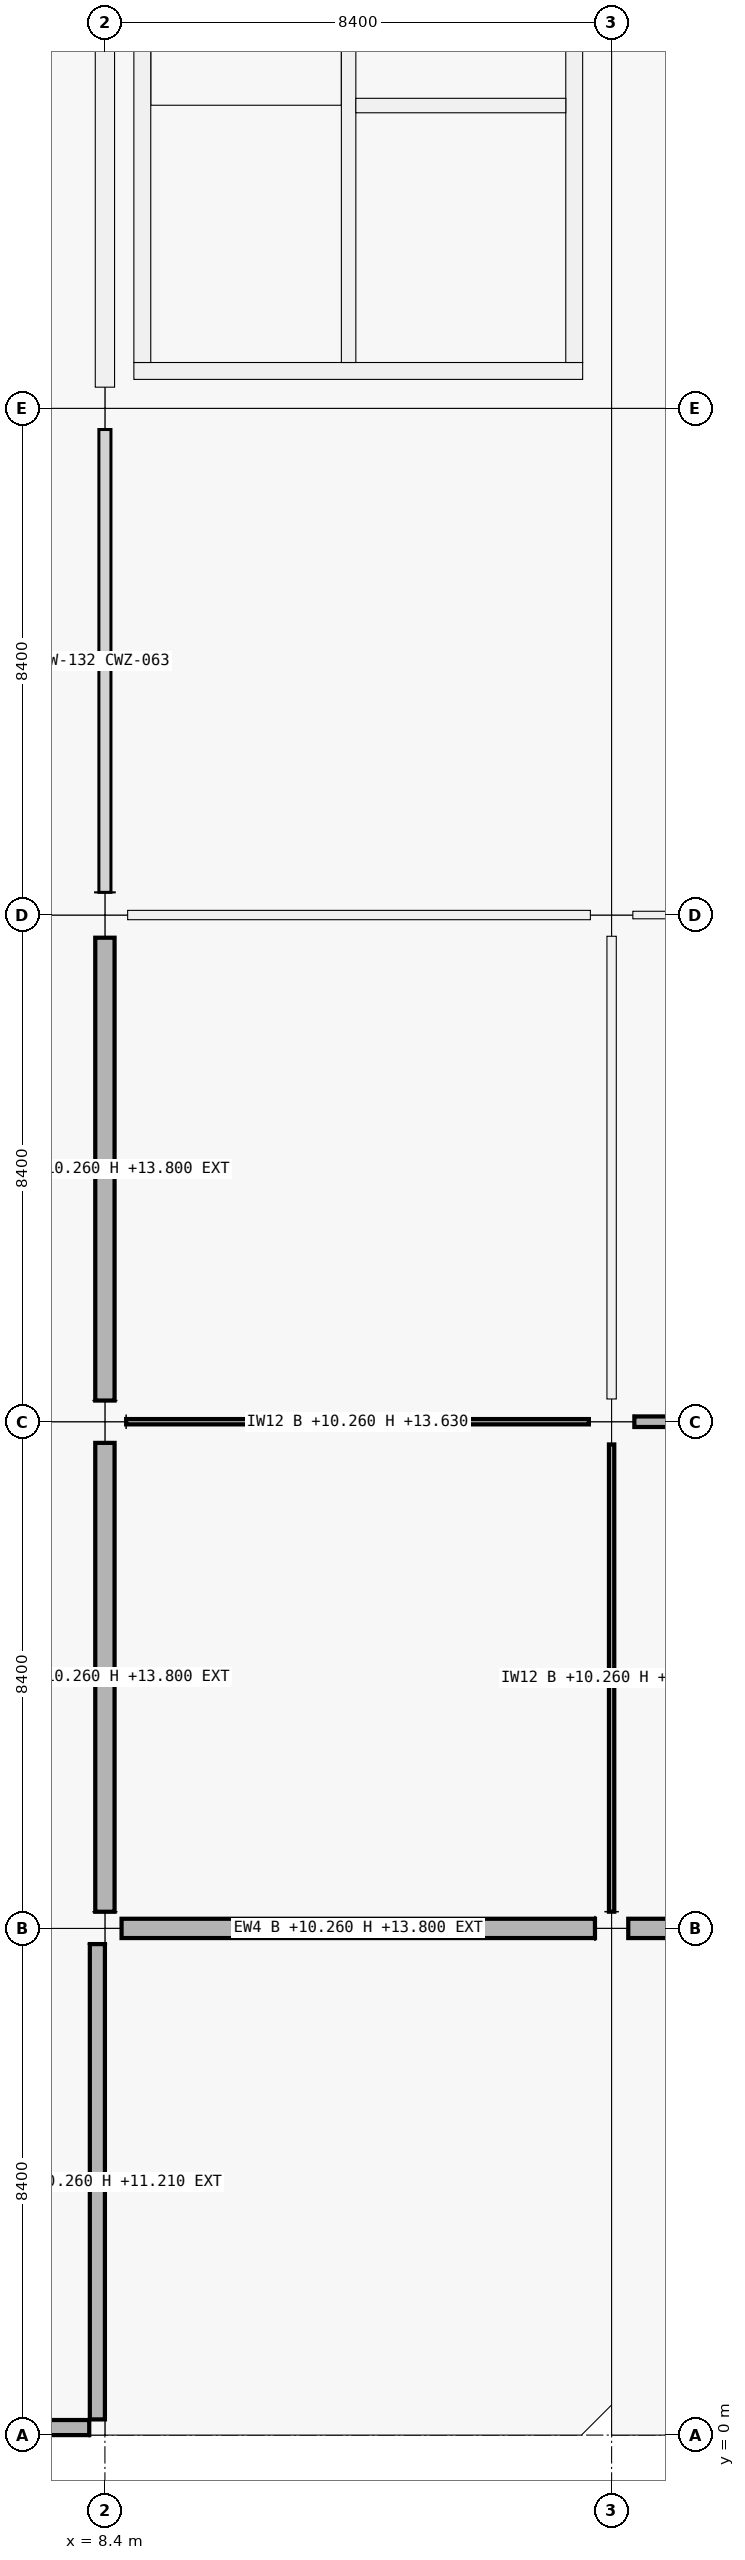
"""IFC4 building model, lengths in metres.
Left out: names, types, materials, properties, quantities, classifications, styles, units other than length and angle.
Written with IfcOpenShell. Run it as: python <this file> out.ifc"""

import sys

from ifc_helpers import new_model, si_unit, direction, frame, frame_2d, origin, origin_2d, place, context, subcontext, project, spatial, rectangle, extrude, element, fill, save


model = new_model("IFC4")
c1 = context("Model", 3, precision=1e-05, world=origin(), true_north=direction((0.0, 1.0)))
c2 = subcontext(c1, "Body", "Model", "MODEL_VIEW")
j1 = project(units=[si_unit("LENGTHUNIT", "METRE"), si_unit("PLANEANGLEUNIT", "RADIAN")], contexts=[c1])
p1 = place(None, origin())
s1 = spatial("IfcSite", under=j1, at=p1, CompositionType="ELEMENT")
p2 = place(p1, origin())
s2 = spatial("IfcBuilding", under=s1, at=p2, CompositionType="ELEMENT")
p3 = place(p2, frame((0.0, 0.0, 10.26)))
s3 = spatial("IfcBuildingStorey", under=s2, at=p3, CompositionType="ELEMENT", Elevation=10.26)
p4 = place(p3, frame((8.4, 8.4, 0.0), z_axis=(0.0, 0.0, 1.0), x_axis=(1.0, 0.0, 0.0)))
e1 = element("IfcColumn", 1, at=p4, inside=s3, PredefinedType="COLUMN", context=c2, shape_type="SweptSolid", body=[
    extrude(rectangle(XDim=0.55, YDim=0.55, at=origin_2d()), origin(), (0.0, 0.0, 1.0), 4.25),
])
p5 = place(p3, frame((8.4, 16.8, 0.0), z_axis=(0.0, 0.0, 1.0), x_axis=(1.0, 0.0, 0.0)))
e2 = element("IfcColumn", 2, at=p5, inside=s3, PredefinedType="COLUMN", context=c2, shape_type="SweptSolid", body=[
    extrude(rectangle(XDim=0.7, YDim=0.7, at=origin_2d()), origin(), (0.0, 0.0, 1.0), 4.5),
])
p6 = place(p3, frame((8.4, 25.2, 0.0), z_axis=(0.0, 0.0, 1.0), x_axis=(1.0, 0.0, 0.0)))
e3 = element("IfcColumn", 3, at=p6, inside=s3, PredefinedType="COLUMN", context=c2, shape_type="SweptSolid", body=[
    extrude(rectangle(XDim=0.75, YDim=0.75, at=origin_2d()), origin(), (0.0, 0.0, 1.0), 4.5),
])
p7 = place(p3, frame((8.4, 33.6, 0.0), z_axis=(0.0, 0.0, 1.0), x_axis=(1.0, 0.0, 0.0)))
e4 = element("IfcColumn", 4, at=p7, inside=s3, PredefinedType="COLUMN", context=c2, shape_type="SweptSolid", body=[
    extrude(rectangle(XDim=0.7, YDim=0.7, at=origin_2d()), origin(), (0.0, 0.0, 1.0), 4.5),
])
p8 = place(p3, frame((16.8, 8.4, 0.0), z_axis=(0.0, 0.0, 1.0), x_axis=(1.0, 0.0, 0.0)))
e5 = element("IfcColumn", 5, at=p8, inside=s3, PredefinedType="COLUMN", context=c2, shape_type="SweptSolid", body=[
    extrude(rectangle(XDim=0.55, YDim=0.55, at=origin_2d()), origin(), (0.0, 0.0, 1.0), 4.25),
])
p9 = place(p3, frame((16.8, 16.8, 0.0), z_axis=(0.0, 0.0, 1.0), x_axis=(1.0, 0.0, 0.0)))
e6 = element("IfcColumn", 6, at=p9, inside=s3, PredefinedType="COLUMN", context=c2, shape_type="SweptSolid", body=[
    extrude(rectangle(XDim=0.75, YDim=0.75, at=origin_2d()), origin(), (0.0, 0.0, 1.0), 4.5),
])
p10 = place(p3, frame((16.8, 25.2, 0.0), z_axis=(0.0, 0.0, 1.0), x_axis=(1.0, 0.0, 0.0)))
e7 = element("IfcColumn", 7, at=p10, inside=s3, PredefinedType="COLUMN", context=c2, shape_type="SweptSolid", body=[
    extrude(rectangle(XDim=0.7, YDim=0.7, at=origin_2d()), origin(), (0.0, 0.0, 1.0), 4.5),
])
p11 = place(p3, frame((16.8, 33.6, 0.0), z_axis=(0.0, 0.0, 1.0), x_axis=(1.0, 0.0, 0.0)))
e8 = element("IfcColumn", 8, at=p11, inside=s3, PredefinedType="COLUMN", context=c2, shape_type="SweptSolid", body=[
    extrude(rectangle(XDim=0.75, YDim=0.75, at=origin_2d()), origin(), (0.0, 0.0, 1.0), 4.5),
])
p12 = place(p3, frame((16.524, 8.4, 0.0), z_axis=(0.0, 0.0, 1.0), x_axis=(-1.0, 0.0, 0.0)))
e9 = element("IfcWall", 9, at=p12, inside=s3, PredefinedType="SOLIDWALL", context=c2, shape_type="SweptSolid", body=[
    extrude(rectangle(XDim=7.848, YDim=0.32, at=frame_2d((3.924, 0.0))), origin(), (0.0, 0.0, 1.0), 3.54),
])
p13 = place(p12, frame((2.999, 0.0, 0.0)))
e10 = element("IfcOpeningElement", 10, at=p13, cuts=e9, PredefinedType="OPENING", context=c2, shape_type="SweptSolid", body=[
    extrude(rectangle(XDim=1.85, YDim=2.2, at=frame_2d((0.925, 1.1))), frame((0.0, 0.16, 0.0), z_axis=(0.0, -1.0, 0.0), x_axis=(1.0, 0.0, 0.0)), (0.0, 0.0, 1.0), 0.32),
])
p14 = place(p3, frame((8.4, 8.676, 0.0), z_axis=(0.0, 0.0, 1.0), x_axis=(0.0, 1.0, 0.0)))
e11 = element("IfcWall", 11, at=p14, inside=s3, PredefinedType="SOLIDWALL", context=c2, shape_type="SweptSolid", body=[
    extrude(rectangle(XDim=7.773, YDim=0.32, at=frame_2d((3.886, 0.0))), origin(), (0.0, 0.0, 1.0), 3.54),
])
p15 = place(p14, frame((2.861, 0.0, 0.9)))
e12 = element("IfcOpeningElement", 12, at=p15, cuts=e11, PredefinedType="OPENING", context=c2, shape_type="SweptSolid", body=[
    extrude(rectangle(XDim=2.05, YDim=1.45, at=frame_2d((1.025, 0.725))), frame((0.0, 0.16, 0.0), z_axis=(0.0, -1.0, 0.0), x_axis=(1.0, 0.0, 0.0)), (0.0, 0.0, 1.0), 0.32),
])
p16 = place(p3, frame((8.4, 17.151, 0.0), z_axis=(0.0, 0.0, 1.0), x_axis=(0.0, 1.0, 0.0)))
e13 = element("IfcWall", 13, at=p16, inside=s3, PredefinedType="SOLIDWALL", context=c2, shape_type="SweptSolid", body=[
    extrude(rectangle(XDim=7.673, YDim=0.32, at=frame_2d((3.836, 0.0))), origin(), (0.0, 0.0, 1.0), 3.54),
])
p17 = place(p16, frame((2.611, 0.0, 0.9)))
e14 = element("IfcOpeningElement", 14, at=p17, cuts=e13, PredefinedType="OPENING", context=c2, shape_type="SweptSolid", body=[
    extrude(rectangle(XDim=2.45, YDim=1.45, at=frame_2d((1.225, 0.725))), frame((0.0, 0.16, 0.0), z_axis=(0.0, -1.0, 0.0), x_axis=(1.0, 0.0, 0.0)), (0.0, 0.0, 1.0), 0.32),
])
p18 = place(p3, frame((8.4, 33.951, 0.0), z_axis=(0.0, 0.0, 1.0), x_axis=(0.0, 1.0, 0.0)))
e15 = element("IfcWall", 15, at=p18, inside=s3, PredefinedType="SOLIDWALL", context=c2, shape_type="SweptSolid", body=[
    extrude(rectangle(XDim=7.673, YDim=0.32, at=frame_2d((3.836, 0.0))), origin(), (0.0, 0.0, 1.0), 3.54),
])
p19 = place(p3, frame((24.924, 8.4, 0.0), z_axis=(0.0, 0.0, 1.0), x_axis=(-1.0, 0.0, 0.0)))
e16 = element("IfcWall", 16, at=p19, inside=s3, PredefinedType="SOLIDWALL", context=c2, shape_type="SweptSolid", body=[
    extrude(rectangle(XDim=7.848, YDim=0.32, at=frame_2d((3.924, 0.0))), origin(), (0.0, 0.0, 1.0), 3.54),
])
p20 = place(p19, frame((3.099, 0.0, 0.0)))
e17 = element("IfcOpeningElement", 17, at=p20, cuts=e16, PredefinedType="OPENING", context=c2, shape_type="SweptSolid", body=[
    extrude(rectangle(XDim=1.65, YDim=2.2, at=frame_2d((0.825, 1.1))), frame((0.0, 0.16, 0.0), z_axis=(0.0, -1.0, 0.0), x_axis=(1.0, 0.0, 0.0)), (0.0, 0.0, 1.0), 0.32),
])
for number, where, z_axis, x_axis in (
    (18, (8.14, 0.125, 0.0), (0.0, 0.0, 1.0), (-1.0, 0.0, 0.0)),
    (19, (8.275, 8.14, 0.0), (0.0, 0.0, 1.0), (0.0, -1.0, 0.0)),
):
    element("IfcWall", number, at=place(p3, frame(where, z_axis=z_axis, x_axis=x_axis)), inside=s3, PredefinedType="PARAPET", context=c2, shape_type="SweptSolid", body=[
        extrude(rectangle(XDim=7.88, YDim=0.25, at=frame_2d((3.94, 0.0))), origin(), (0.0, 0.0, 1.0), 0.95),
    ])
p21 = place(p3, frame((16.32, 34.22, 0.0), z_axis=(0.0, 0.0, 1.0), x_axis=(-1.0, 0.0, 0.0)))
e20 = element("IfcWall", 20, at=p21, inside=s3, PredefinedType="SHEAR", context=c2, shape_type="SweptSolid", body=[
    extrude(rectangle(XDim=7.44, YDim=0.28, at=frame_2d((3.72, 0.0))), origin(), (0.0, 0.0, 1.0), 4.5),
])
p22 = place(p21, frame((1.28, 0.0, 0.0)))
e21 = element("IfcOpeningElement", 21, at=p22, cuts=e20, PredefinedType="OPENING", context=c2, shape_type="SweptSolid", body=[
    extrude(rectangle(XDim=1.5, YDim=2.15, at=frame_2d((0.75, 1.075))), frame((0.0, 0.14, 0.0), z_axis=(0.0, -1.0, 0.0), x_axis=(1.0, 0.0, 0.0)), (0.0, 0.0, 1.0), 0.28),
])
for number, where, z_axis, x_axis in (
    (22, (9.02, 34.36, 0.0), (0.0, 0.0, 1.0), (0.0, 1.0, 0.0)),
    (23, (16.18, 41.24, 0.0), (0.0, 0.0, 1.0), (0.0, -1.0, 0.0)),
):
    element("IfcWall", number, at=place(p3, frame(where, z_axis=z_axis, x_axis=x_axis)), inside=s3, PredefinedType="SHEAR", context=c2, shape_type="SweptSolid", body=[
        extrude(rectangle(XDim=6.88, YDim=0.28, at=frame_2d((3.44, 0.0))), origin(), (0.0, 0.0, 1.0), 4.5),
    ])
p23 = place(p3, frame((12.44, 34.36, 0.0), z_axis=(0.0, 0.0, 1.0), x_axis=(0.0, 1.0, 0.0)))
e24 = element("IfcWall", 24, at=p23, inside=s3, PredefinedType="SHEAR", context=c2, shape_type="SweptSolid", body=[
    extrude(rectangle(XDim=6.88, YDim=0.24, at=frame_2d((3.44, 0.0))), origin(), (0.0, 0.0, 1.0), 4.5),
])
p24 = place(p23, frame((0.12, 0.0, 0.0)))
e25 = element("IfcOpeningElement", 25, at=p24, cuts=e24, PredefinedType="OPENING", context=c2, shape_type="SweptSolid", body=[
    extrude(rectangle(XDim=1.0, YDim=2.15, at=frame_2d((0.5, 1.075))), frame((0.0, 0.12, 0.0), z_axis=(0.0, -1.0, 0.0), x_axis=(1.0, 0.0, 0.0)), (0.0, 0.0, 1.0), 0.24),
])
p25 = place(p3, frame((12.56, 38.62, 0.0), z_axis=(0.0, 0.0, 1.0), x_axis=(1.0, 0.0, 0.0)))
e26 = element("IfcWall", 26, at=p25, inside=s3, PredefinedType="SHEAR", context=c2, shape_type="SweptSolid", body=[
    extrude(rectangle(XDim=3.48, YDim=0.24, at=frame_2d((1.74, 0.0))), origin(), (0.0, 0.0, 1.0), 4.5),
])
p26 = place(p25, frame((1.19, 0.0, 0.0)))
e27 = element("IfcOpeningElement", 27, at=p26, cuts=e26, PredefinedType="OPENING", context=c2, shape_type="SweptSolid", body=[
    extrude(rectangle(XDim=1.1, YDim=2.15, at=frame_2d((0.55, 1.075))), frame((0.0, 0.12, 0.0), z_axis=(0.0, -1.0, 0.0), x_axis=(1.0, 0.0, 0.0)), (0.0, 0.0, 1.0), 0.24),
])
p27 = place(p3, frame((8.752, 16.8, 0.0), z_axis=(0.0, 0.0, 1.0), x_axis=(1.0, 0.0, 0.0)))
e28 = element("IfcWall", 28, at=p27, inside=s3, PredefinedType="PARTITIONING", context=c2, shape_type="SweptSolid", body=[
    extrude(rectangle(XDim=7.671, YDim=0.088, at=frame_2d((3.835, 0.0))), origin(), (0.0, 0.0, 1.0), 3.37),
])
p28 = place(p27, frame((3.351, 0.0, 0.0)))
e29 = element("IfcOpeningElement", 29, at=p28, cuts=e28, PredefinedType="OPENING", context=c2, shape_type="SweptSolid", body=[
    extrude(rectangle(XDim=0.97, YDim=2.12, at=frame_2d((0.485, 1.06))), frame((0.0, 0.044, 0.0), z_axis=(0.0, -1.0, 0.0), x_axis=(1.0, 0.0, 0.0)), (0.0, 0.0, 1.0), 0.088),
])
p29 = place(p3, frame((8.777, 25.2, 0.0), z_axis=(0.0, 0.0, 1.0), x_axis=(1.0, 0.0, 0.0)))
e30 = element("IfcWall", 30, at=p29, inside=s3, PredefinedType="PARTITIONING", context=c2, shape_type="SweptSolid", body=[
    extrude(rectangle(XDim=7.671, YDim=0.155, at=frame_2d((3.835, 0.0))), origin(), (0.0, 0.0, 1.0), 3.37),
])
p30 = place(p29, frame((3.371, 0.0, 0.0)))
e31 = element("IfcOpeningElement", 31, at=p30, cuts=e30, PredefinedType="OPENING", context=c2, shape_type="SweptSolid", body=[
    extrude(rectangle(XDim=0.93, YDim=2.12, at=frame_2d((0.465, 1.06))), frame((0.0, 0.078, 0.0), z_axis=(0.0, -1.0, 0.0), x_axis=(1.0, 0.0, 0.0)), (0.0, 0.0, 1.0), 0.155),
])
p31 = place(p3, frame((17.177, 16.8, 0.0), z_axis=(0.0, 0.0, 1.0), x_axis=(1.0, 0.0, 0.0)))
e32 = element("IfcWall", 32, at=p31, inside=s3, PredefinedType="PARTITIONING", context=c2, shape_type="SweptSolid", body=[
    extrude(rectangle(XDim=7.671, YDim=0.175, at=frame_2d((3.835, 0.0))), origin(), (0.0, 0.0, 1.0), 3.37),
])
p32 = place(p31, frame((3.371, 0.0, 0.0)))
e33 = element("IfcOpeningElement", 33, at=p32, cuts=e32, PredefinedType="OPENING", context=c2, shape_type="SweptSolid", body=[
    extrude(rectangle(XDim=0.93, YDim=2.12, at=frame_2d((0.465, 1.06))), frame((0.0, 0.087, 0.0), z_axis=(0.0, -1.0, 0.0), x_axis=(1.0, 0.0, 0.0)), (0.0, 0.0, 1.0), 0.175),
])
p33 = place(p3, frame((17.152, 25.2, 0.0), z_axis=(0.0, 0.0, 1.0), x_axis=(1.0, 0.0, 0.0)))
e34 = element("IfcWall", 34, at=p33, inside=s3, PredefinedType="PARTITIONING", context=c2, shape_type="SweptSolid", body=[
    extrude(rectangle(XDim=7.671, YDim=0.125, at=frame_2d((3.835, 0.0))), origin(), (0.0, 0.0, 1.0), 3.37),
])
p34 = place(p33, frame((3.306, 0.0, 0.0)))
e35 = element("IfcOpeningElement", 35, at=p34, cuts=e34, PredefinedType="OPENING", context=c2, shape_type="SweptSolid", body=[
    extrude(rectangle(XDim=1.06, YDim=2.25, at=frame_2d((0.53, 1.125))), frame((0.0, 0.062, 0.0), z_axis=(0.0, -1.0, 0.0), x_axis=(1.0, 0.0, 0.0)), (0.0, 0.0, 1.0), 0.125),
])
p35 = place(p3, frame((16.8, 8.677, 0.0), z_axis=(0.0, 0.0, 1.0), x_axis=(0.0, 1.0, 0.0)))
e36 = element("IfcWall", 36, at=p35, inside=s3, PredefinedType="PARTITIONING", context=c2, shape_type="SweptSolid", body=[
    extrude(rectangle(XDim=7.746, YDim=0.088, at=frame_2d((3.873, 0.0))), origin(), (0.0, 0.0, 1.0), 3.37),
])
p36 = place(p35, frame((3.353, 0.0, 0.0)))
e37 = element("IfcOpeningElement", 37, at=p36, cuts=e36, PredefinedType="OPENING", context=c2, shape_type="SweptSolid", body=[
    extrude(rectangle(XDim=1.04, YDim=2.2, at=frame_2d((0.52, 1.1))), frame((0.0, 0.044, 0.0), z_axis=(0.0, -1.0, 0.0), x_axis=(1.0, 0.0, 0.0)), (0.0, 0.0, 1.0), 0.088),
])
p37 = place(p3, frame((16.8, 17.177, 0.0), z_axis=(0.0, 0.0, 1.0), x_axis=(0.0, 1.0, 0.0)))
e38 = element("IfcWall", 38, at=p37, inside=s3, PredefinedType="PARTITIONING", context=c2, shape_type="SweptSolid", body=[
    extrude(rectangle(XDim=7.671, YDim=0.155, at=frame_2d((3.835, 0.0))), origin(), (0.0, 0.0, 1.0), 3.37),
])
p38 = place(p37, frame((3.325, 0.0, 0.0)))
e39 = element("IfcOpeningElement", 39, at=p38, cuts=e38, PredefinedType="OPENING", context=c2, shape_type="SweptSolid", body=[
    extrude(rectangle(XDim=1.02, YDim=2.2, at=frame_2d((0.51, 1.1))), frame((0.0, 0.078, 0.0), z_axis=(0.0, -1.0, 0.0), x_axis=(1.0, 0.0, 0.0)), (0.0, 0.0, 1.0), 0.155),
])
p39 = place(p13, origin())
e40 = element("IfcDoor", 40, at=p39, inside=s3, OperationType="DOUBLE_DOOR_SINGLE_SWING", PredefinedType="DOOR", context=c2, shape_type="SweptSolid", body=[
    extrude(rectangle(XDim=1.85, YDim=2.2, at=frame_2d((0.925, 1.1))), frame((0.0, 0.025, 0.0), z_axis=(0.0, -1.0, 0.0), x_axis=(1.0, 0.0, 0.0)), (0.0, 0.0, 1.0), 0.05),
])
fill(e10, e40)
p40 = place(p15, origin())
e41 = element("IfcWindow", 41, at=p40, inside=s3, PartitioningType="SINGLE_PANEL", PredefinedType="WINDOW", context=c2, shape_type="SweptSolid", body=[
    extrude(rectangle(XDim=2.05, YDim=1.45, at=frame_2d((1.025, 0.725))), frame((0.0, 0.03, 0.0), z_axis=(0.0, -1.0, 0.0), x_axis=(1.0, 0.0, 0.0)), (0.0, 0.0, 1.0), 0.06),
])
fill(e12, e41)
p41 = place(p17, origin())
e42 = element("IfcWindow", 42, at=p41, inside=s3, PartitioningType="SINGLE_PANEL", PredefinedType="WINDOW", context=c2, shape_type="SweptSolid", body=[
    extrude(rectangle(XDim=2.45, YDim=1.45, at=frame_2d((1.225, 0.725))), frame((0.0, 0.03, 0.0), z_axis=(0.0, -1.0, 0.0), x_axis=(1.0, 0.0, 0.0)), (0.0, 0.0, 1.0), 0.06),
])
fill(e14, e42)
p42 = place(p24, origin())
e43 = element("IfcDoor", 43, at=p42, inside=s3, OperationType="SINGLE_SWING_RIGHT", PredefinedType="DOOR", context=c2, shape_type="SweptSolid", body=[
    extrude(rectangle(XDim=1.0, YDim=2.15, at=frame_2d((0.5, 1.075))), frame((0.0, 0.025, 0.0), z_axis=(0.0, -1.0, 0.0), x_axis=(1.0, 0.0, 0.0)), (0.0, 0.0, 1.0), 0.05),
])
fill(e25, e43)
p43 = place(p22, origin())
e44 = element("IfcDoor", 44, at=p43, inside=s3, OperationType="DOUBLE_DOOR_SINGLE_SWING", PredefinedType="DOOR", context=c2, shape_type="SweptSolid", body=[
    extrude(rectangle(XDim=1.5, YDim=2.15, at=frame_2d((0.75, 1.075))), frame((0.0, 0.025, 0.0), z_axis=(0.0, -1.0, 0.0), x_axis=(1.0, 0.0, 0.0)), (0.0, 0.0, 1.0), 0.05),
])
fill(e21, e44)
p44 = place(p26, origin())
e45 = element("IfcDoor", 45, at=p44, inside=s3, OperationType="DOUBLE_DOOR_SLIDING", PredefinedType="DOOR", context=c2, shape_type="SweptSolid", body=[
    extrude(rectangle(XDim=1.1, YDim=2.15, at=frame_2d((0.55, 1.075))), frame((0.0, 0.025, 0.0), z_axis=(0.0, -1.0, 0.0), x_axis=(1.0, 0.0, 0.0)), (0.0, 0.0, 1.0), 0.05),
])
fill(e27, e45)
p45 = place(p30, origin())
e46 = element("IfcDoor", 46, at=p45, inside=s3, OperationType="SINGLE_SWING_RIGHT", PredefinedType="DOOR", context=c2, shape_type="SweptSolid", body=[
    extrude(rectangle(XDim=0.93, YDim=2.12, at=frame_2d((0.465, 1.06))), frame((0.0, 0.025, 0.0), z_axis=(0.0, -1.0, 0.0), x_axis=(1.0, 0.0, 0.0)), (0.0, 0.0, 1.0), 0.05),
])
fill(e31, e46)
p46 = place(p28, origin())
e47 = element("IfcDoor", 47, at=p46, inside=s3, OperationType="SINGLE_SWING_RIGHT", PredefinedType="DOOR", context=c2, shape_type="SweptSolid", body=[
    extrude(rectangle(XDim=0.97, YDim=2.12, at=frame_2d((0.485, 1.06))), frame((0.0, 0.025, 0.0), z_axis=(0.0, -1.0, 0.0), x_axis=(1.0, 0.0, 0.0)), (0.0, 0.0, 1.0), 0.05),
])
fill(e29, e47)
p47 = place(p36, origin())
e48 = element("IfcDoor", 48, at=p47, inside=s3, OperationType="SINGLE_SWING_RIGHT", PredefinedType="DOOR", context=c2, shape_type="SweptSolid", body=[
    extrude(rectangle(XDim=1.04, YDim=2.2, at=frame_2d((0.52, 1.1))), frame((0.0, 0.025, 0.0), z_axis=(0.0, -1.0, 0.0), x_axis=(1.0, 0.0, 0.0)), (0.0, 0.0, 1.0), 0.05),
])
fill(e37, e48)
p48 = place(p38, origin())
e49 = element("IfcDoor", 49, at=p48, inside=s3, OperationType="SINGLE_SWING_LEFT", PredefinedType="DOOR", context=c2, shape_type="SweptSolid", body=[
    extrude(rectangle(XDim=1.02, YDim=2.2, at=frame_2d((0.51, 1.1))), frame((0.0, 0.025, 0.0), z_axis=(0.0, -1.0, 0.0), x_axis=(1.0, 0.0, 0.0)), (0.0, 0.0, 1.0), 0.05),
])
fill(e39, e49)
save(model, sys.argv[1])
